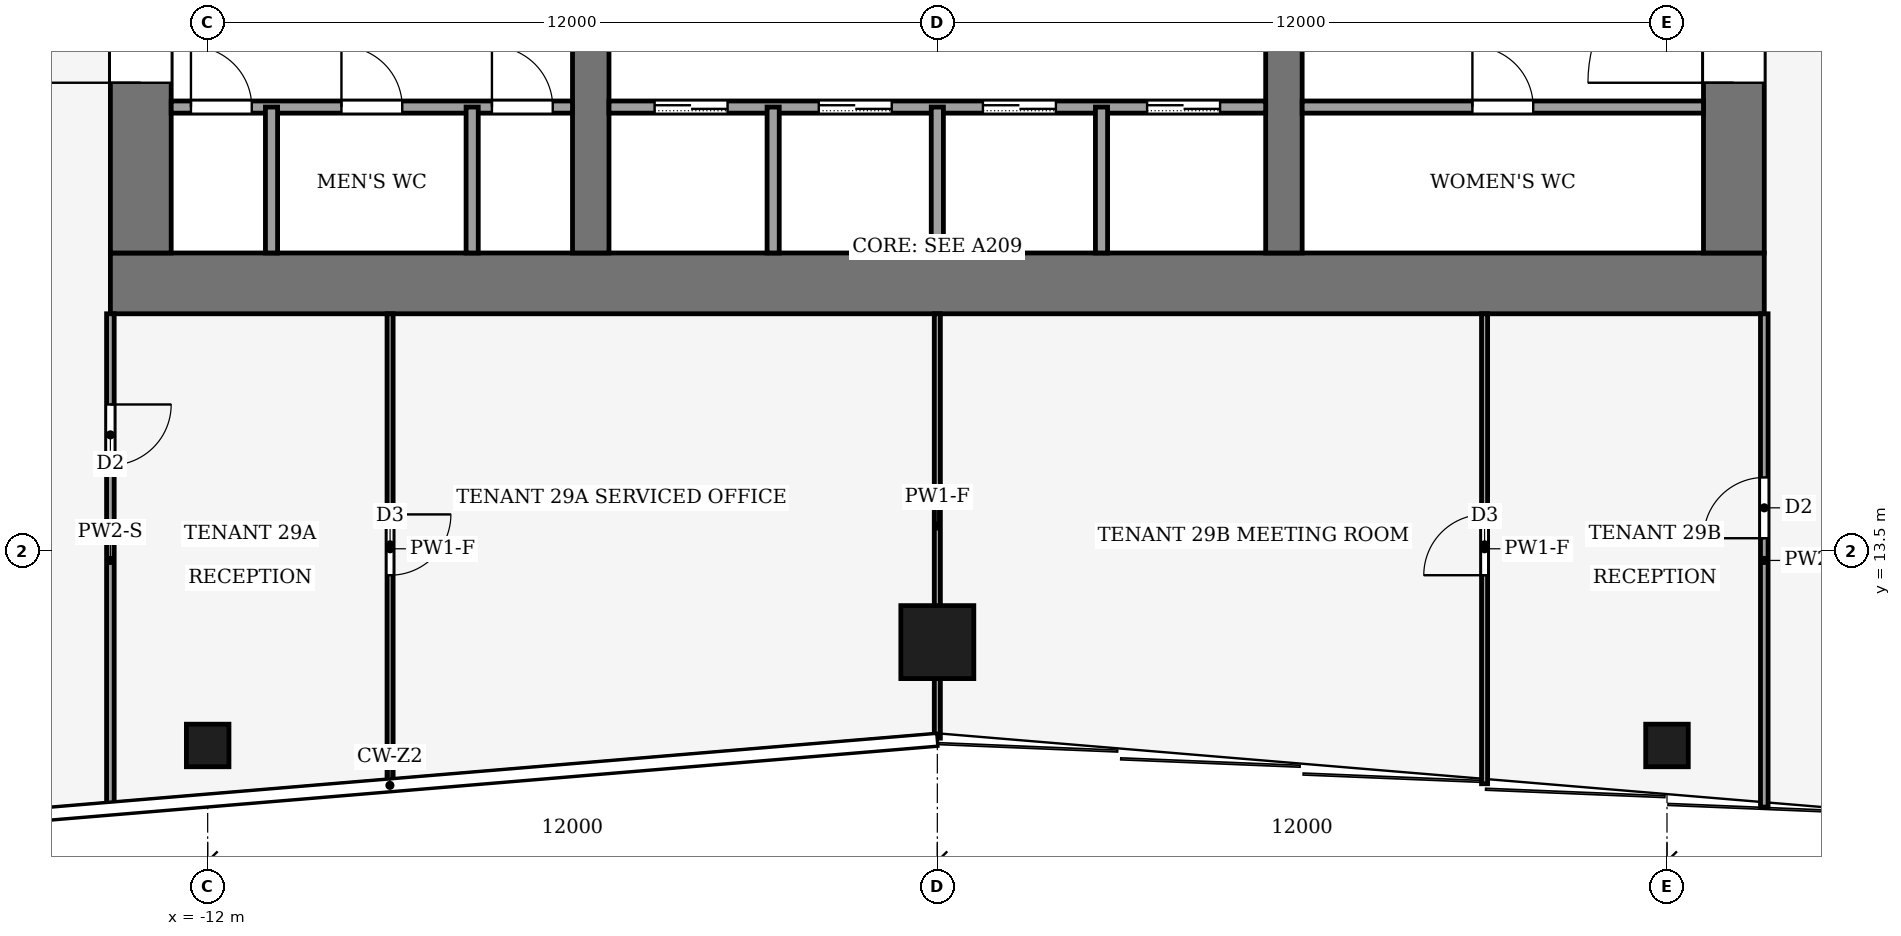
"""IFC4 building model, lengths in metres.
Left out: names, types, materials, properties, quantities, classifications, styles, units other than length and angle.
Written with IfcOpenShell. Run it as: python <this file> out.ifc"""

import sys

from ifc_helpers import new_model, si_unit, direction, frame, frame_2d, origin, origin_2d, place, context, subcontext, project, spatial, rectangle, hollow_rectangle, extrude, element, fill, save


model = new_model("IFC4")
c1 = context("Model", 3, precision=1e-05, world=origin(), true_north=direction((0.0, 1.0)))
c2 = subcontext(c1, "Body", "Model", "MODEL_VIEW")
j1 = project(units=[si_unit("LENGTHUNIT", "METRE"), si_unit("PLANEANGLEUNIT", "RADIAN")], contexts=[c1])
p1 = place(None, origin())
s1 = spatial("IfcSite", under=j1, at=p1, CompositionType="ELEMENT")
p2 = place(p1, origin())
s2 = spatial("IfcBuilding", under=s1, at=p2, CompositionType="ELEMENT")
p3 = place(p2, frame((0.0, 0.0, 130.0)))
s3 = spatial("IfcBuildingStorey", under=s2, at=p3, CompositionType="ELEMENT", Elevation=130.0)
p4 = place(p3, frame((-13.6, 17.9, -0.13), z_axis=(0.0, 0.0, 1.0), x_axis=(1.0, 0.0, 0.0)))
e1 = element("IfcWall", 1, at=p4, inside=s3, PredefinedType="SHEAR", context=c2, shape_type="SweptSolid", body=[
    extrude(rectangle(XDim=27.2, YDim=1.0, at=frame_2d((13.6, 0.0))), origin(), (0.0, 0.0, 1.0), 4.0),
])
p5 = place(p3, frame((-13.1, 18.4, -0.13), z_axis=(0.0, 0.0, 1.0), x_axis=(0.0, 1.0, 0.0)))
e2 = element("IfcWall", 2, at=p5, inside=s3, PredefinedType="SHEAR", context=c2, shape_type="SweptSolid", body=[
    extrude(rectangle(XDim=19.2, YDim=1.0, at=frame_2d((9.6, 0.0))), origin(), (0.0, 0.0, 1.0), 4.0),
])
p6 = place(p5, frame((2.8, 0.0, 0.13)))
e3 = element("IfcOpeningElement", 3, at=p6, cuts=e2, PredefinedType="OPENING", context=c2, shape_type="SweptSolid", body=[
    extrude(rectangle(XDim=2.4, YDim=2.4, at=frame_2d((1.2, 1.2))), frame((0.0, 0.51, 0.0), z_axis=(0.0, -1.0, 0.0), x_axis=(1.0, 0.0, 0.0)), (0.0, 0.0, 1.0), 1.02),
])
p7 = place(p5, frame((13.4, 0.0, 0.13)))
e4 = element("IfcOpeningElement", 4, at=p7, cuts=e2, PredefinedType="OPENING", context=c2, shape_type="SweptSolid", body=[
    extrude(rectangle(XDim=1.4, YDim=2.2, at=frame_2d((0.7, 1.1))), frame((0.0, 0.51, 0.0), z_axis=(0.0, -1.0, 0.0), x_axis=(1.0, 0.0, 0.0)), (0.0, 0.0, 1.0), 1.02),
])
p8 = place(p3, frame((13.1, 18.4, -0.13), z_axis=(0.0, 0.0, 1.0), x_axis=(0.0, 1.0, 0.0)))
e5 = element("IfcWall", 5, at=p8, inside=s3, PredefinedType="SHEAR", context=c2, shape_type="SweptSolid", body=[
    extrude(rectangle(XDim=19.2, YDim=1.0, at=frame_2d((9.6, 0.0))), origin(), (0.0, 0.0, 1.0), 4.0),
])
p9 = place(p8, frame((2.8, 0.0, 0.13)))
e6 = element("IfcOpeningElement", 6, at=p9, cuts=e5, PredefinedType="OPENING", context=c2, shape_type="SweptSolid", body=[
    extrude(rectangle(XDim=2.4, YDim=2.4, at=frame_2d((1.2, 1.2))), frame((0.0, 0.51, 0.0), z_axis=(0.0, -1.0, 0.0), x_axis=(1.0, 0.0, 0.0)), (0.0, 0.0, 1.0), 1.02),
])
p10 = place(p8, frame((13.3, 0.0, 0.13)))
e7 = element("IfcOpeningElement", 7, at=p10, cuts=e5, PredefinedType="OPENING", context=c2, shape_type="SweptSolid", body=[
    extrude(rectangle(XDim=2.4, YDim=2.4, at=frame_2d((1.2, 1.2))), frame((0.0, 0.51, 0.0), z_axis=(0.0, -1.0, 0.0), x_axis=(1.0, 0.0, 0.0)), (0.0, 0.0, 1.0), 1.02),
])
p11 = place(p3, frame((-5.7, 18.4, -0.13), z_axis=(0.0, 0.0, 1.0), x_axis=(0.0, 1.0, 0.0)))
e8 = element("IfcWall", 8, at=p11, inside=s3, PredefinedType="SHEAR", context=c2, shape_type="SweptSolid", body=[
    extrude(rectangle(XDim=19.2, YDim=0.6, at=frame_2d((9.6, 0.0))), origin(), (0.0, 0.0, 1.0), 4.0),
])
p12 = place(p11, frame((8.35, 0.0, 0.13)))
e9 = element("IfcOpeningElement", 9, at=p12, cuts=e8, PredefinedType="OPENING", context=c2, shape_type="SweptSolid", body=[
    extrude(rectangle(XDim=0.9, YDim=2.1, at=frame_2d((0.45, 1.05))), frame((0.0, 0.31, 0.0), z_axis=(0.0, -1.0, 0.0), x_axis=(1.0, 0.0, 0.0)), (0.0, 0.0, 1.0), 0.62),
])
p13 = place(p3, frame((5.7, 18.4, -0.13), z_axis=(0.0, 0.0, 1.0), x_axis=(0.0, 1.0, 0.0)))
e10 = element("IfcWall", 10, at=p13, inside=s3, PredefinedType="SHEAR", context=c2, shape_type="SweptSolid", body=[
    extrude(rectangle(XDim=19.2, YDim=0.6, at=frame_2d((9.6, 0.0))), origin(), (0.0, 0.0, 1.0), 4.0),
])
p14 = place(p13, frame((8.35, 0.0, 0.13)))
e11 = element("IfcOpeningElement", 11, at=p14, cuts=e10, PredefinedType="OPENING", context=c2, shape_type="SweptSolid", body=[
    extrude(rectangle(XDim=0.9, YDim=2.1, at=frame_2d((0.45, 1.05))), frame((0.0, 0.31, 0.0), z_axis=(0.0, -1.0, 0.0), x_axis=(1.0, 0.0, 0.0)), (0.0, 0.0, 1.0), 0.62),
])
p15 = place(p13, frame((13.3, 0.0, 0.13)))
e12 = element("IfcOpeningElement", 12, at=p15, cuts=e10, PredefinedType="OPENING", context=c2, shape_type="SweptSolid", body=[
    extrude(rectangle(XDim=2.4, YDim=2.4, at=frame_2d((1.2, 1.2))), frame((0.0, 0.31, 0.0), z_axis=(0.0, -1.0, 0.0), x_axis=(1.0, 0.0, 0.0)), (0.0, 0.0, 1.0), 0.62),
])
p16 = place(p3, frame((0.0, 12.0, 0.0), z_axis=(0.0, 0.0, 1.0), x_axis=(1.0, 0.0, 0.0)))
e13 = element("IfcColumn", 13, at=p16, inside=s3, PredefinedType="COLUMN", context=c2, shape_type="SweptSolid", body=[
    extrude(hollow_rectangle(XDim=1.2, YDim=1.2, WallThickness=0.07, at=origin_2d()), origin(), (0.0, 0.0, 1.0), 4.0),
])
for number, where, z_axis, x_axis in (
    (14, (-12.0, 10.3, 0.0), (0.0, 0.0, 1.0), (1.0, 0.0, 0.0)),
    (15, (12.0, 10.3, 0.0), (0.0, 0.0, 1.0), (1.0, 0.0, 0.0)),
):
    element("IfcColumn", number, at=place(p3, frame(where, z_axis=z_axis, x_axis=x_axis)), inside=s3, PredefinedType="COLUMN", context=c2, shape_type="SweptSolid", body=[
        extrude(hollow_rectangle(XDim=0.7, YDim=0.7, WallThickness=0.03, at=origin_2d()), origin(), (0.0, 0.0, 1.0), 4.0),
    ])
p17 = place(p3, frame((-12.6, 20.8, 0.0), z_axis=(0.0, 0.0, 1.0), x_axis=(1.0, 0.0, 0.0)))
e16 = element("IfcWall", 16, at=p17, inside=s3, PredefinedType="PARTITIONING", context=c2, shape_type="SweptSolid", body=[
    extrude(rectangle(XDim=6.6, YDim=0.2, at=frame_2d((3.3, 0.0))), origin(), (0.0, 0.0, 1.0), 3.87),
])
p18 = place(p17, frame((0.325, 0.0, 0.0)))
e17 = element("IfcOpeningElement", 17, at=p18, cuts=e16, PredefinedType="OPENING", context=c2, shape_type="SweptSolid", body=[
    extrude(rectangle(XDim=1.0, YDim=2.1, at=frame_2d((0.5, 1.05))), frame((0.0, 0.11, 0.0), z_axis=(0.0, -1.0, 0.0), x_axis=(1.0, 0.0, 0.0)), (0.0, 0.0, 1.0), 0.22),
])
p19 = place(p17, frame((2.8, 0.0, 0.0)))
e18 = element("IfcOpeningElement", 18, at=p19, cuts=e16, PredefinedType="OPENING", context=c2, shape_type="SweptSolid", body=[
    extrude(rectangle(XDim=1.0, YDim=2.1, at=frame_2d((0.5, 1.05))), frame((0.0, 0.11, 0.0), z_axis=(0.0, -1.0, 0.0), x_axis=(1.0, 0.0, 0.0)), (0.0, 0.0, 1.0), 0.22),
])
p20 = place(p17, frame((5.275, 0.0, 0.0)))
e19 = element("IfcOpeningElement", 19, at=p20, cuts=e16, PredefinedType="OPENING", context=c2, shape_type="SweptSolid", body=[
    extrude(rectangle(XDim=1.0, YDim=2.1, at=frame_2d((0.5, 1.05))), frame((0.0, 0.11, 0.0), z_axis=(0.0, -1.0, 0.0), x_axis=(1.0, 0.0, 0.0)), (0.0, 0.0, 1.0), 0.22),
])
p21 = place(p3, frame((-5.4, 20.8, 0.0), z_axis=(0.0, 0.0, 1.0), x_axis=(1.0, 0.0, 0.0)))
e20 = element("IfcWall", 20, at=p21, inside=s3, PredefinedType="PARTITIONING", context=c2, shape_type="SweptSolid", body=[
    extrude(rectangle(XDim=10.8, YDim=0.2, at=frame_2d((5.4, 0.0))), origin(), (0.0, 0.0, 1.0), 3.87),
])
p22 = place(p21, frame((0.75, 0.0, 0.0)))
e21 = element("IfcOpeningElement", 21, at=p22, cuts=e20, PredefinedType="OPENING", context=c2, shape_type="SweptSolid", body=[
    extrude(rectangle(XDim=1.2, YDim=2.2, at=frame_2d((0.6, 1.1))), frame((0.0, 0.11, 0.0), z_axis=(0.0, -1.0, 0.0), x_axis=(1.0, 0.0, 0.0)), (0.0, 0.0, 1.0), 0.22),
])
p23 = place(p21, frame((3.45, 0.0, 0.0)))
e22 = element("IfcOpeningElement", 22, at=p23, cuts=e20, PredefinedType="OPENING", context=c2, shape_type="SweptSolid", body=[
    extrude(rectangle(XDim=1.2, YDim=2.2, at=frame_2d((0.6, 1.1))), frame((0.0, 0.11, 0.0), z_axis=(0.0, -1.0, 0.0), x_axis=(1.0, 0.0, 0.0)), (0.0, 0.0, 1.0), 0.22),
])
p24 = place(p21, frame((6.15, 0.0, 0.0)))
e23 = element("IfcOpeningElement", 23, at=p24, cuts=e20, PredefinedType="OPENING", context=c2, shape_type="SweptSolid", body=[
    extrude(rectangle(XDim=1.2, YDim=2.2, at=frame_2d((0.6, 1.1))), frame((0.0, 0.11, 0.0), z_axis=(0.0, -1.0, 0.0), x_axis=(1.0, 0.0, 0.0)), (0.0, 0.0, 1.0), 0.22),
])
p25 = place(p21, frame((8.85, 0.0, 0.0)))
e24 = element("IfcOpeningElement", 24, at=p25, cuts=e20, PredefinedType="OPENING", context=c2, shape_type="SweptSolid", body=[
    extrude(rectangle(XDim=1.2, YDim=2.2, at=frame_2d((0.6, 1.1))), frame((0.0, 0.11, 0.0), z_axis=(0.0, -1.0, 0.0), x_axis=(1.0, 0.0, 0.0)), (0.0, 0.0, 1.0), 0.22),
])
p26 = place(p3, frame((6.0, 20.8, 0.0), z_axis=(0.0, 0.0, 1.0), x_axis=(1.0, 0.0, 0.0)))
e25 = element("IfcWall", 25, at=p26, inside=s3, PredefinedType="PARTITIONING", context=c2, shape_type="SweptSolid", body=[
    extrude(rectangle(XDim=6.6, YDim=0.2, at=frame_2d((3.3, 0.0))), origin(), (0.0, 0.0, 1.0), 3.87),
])
p27 = place(p26, frame((2.8, 0.0, 0.0)))
e26 = element("IfcOpeningElement", 26, at=p27, cuts=e25, PredefinedType="OPENING", context=c2, shape_type="SweptSolid", body=[
    extrude(rectangle(XDim=1.0, YDim=2.1, at=frame_2d((0.5, 1.05))), frame((0.0, 0.11, 0.0), z_axis=(0.0, -1.0, 0.0), x_axis=(1.0, 0.0, 0.0)), (0.0, 0.0, 1.0), 0.22),
])
for number, where, z_axis, x_axis in (
    (27, (-10.95, 18.4, 0.0), (0.0, 0.0, 1.0), (0.0, 1.0, 0.0)),
    (28, (-7.65, 18.4, 0.0), (0.0, 0.0, 1.0), (0.0, 1.0, 0.0)),
    (29, (-2.7, 18.4, 0.0), (0.0, 0.0, 1.0), (0.0, 1.0, 0.0)),
    (30, (0.0, 18.4, 0.0), (0.0, 0.0, 1.0), (0.0, 1.0, 0.0)),
    (31, (2.7, 18.4, 0.0), (0.0, 0.0, 1.0), (0.0, 1.0, 0.0)),
):
    element("IfcWall", number, at=place(p3, frame(where, z_axis=z_axis, x_axis=x_axis)), inside=s3, PredefinedType="PARTITIONING", context=c2, shape_type="SweptSolid", body=[
        extrude(rectangle(XDim=2.4, YDim=0.2, at=frame_2d((1.2, 0.0))), origin(), (0.0, 0.0, 1.0), 3.87),
    ])
p28 = place(p3, frame((-13.6, 17.4, 0.0), z_axis=(0.0, 0.0, 1.0), x_axis=(0.0, -1.0, 0.0)))
e32 = element("IfcWall", 32, at=p28, inside=s3, PredefinedType="PARTITIONING", context=c2, shape_type="SweptSolid", body=[
    extrude(rectangle(XDim=8.113, YDim=0.125, at=frame_2d((4.057, 0.0))), origin(), (0.0, 0.0, 1.0), 3.04),
])
p29 = place(p28, frame((1.492, 0.0, 0.0)))
e33 = element("IfcOpeningElement", 33, at=p29, cuts=e32, PredefinedType="OPENING", context=c2, shape_type="SweptSolid", body=[
    extrude(rectangle(XDim=1.0, YDim=2.1, at=frame_2d((0.5, 1.05))), frame((0.0, 0.073, 0.0), z_axis=(0.0, -1.0, 0.0), x_axis=(1.0, 0.0, 0.0)), (0.0, 0.0, 1.0), 0.145),
])
p30 = place(p3, frame((13.6, 9.287, 0.0), z_axis=(0.0, 0.0, 1.0), x_axis=(0.0, 1.0, 0.0)))
e34 = element("IfcWall", 34, at=p30, inside=s3, PredefinedType="PARTITIONING", context=c2, shape_type="SweptSolid", body=[
    extrude(rectangle(XDim=8.113, YDim=0.125, at=frame_2d((4.057, 0.0))), origin(), (0.0, 0.0, 1.0), 3.04),
])
p31 = place(p30, frame((4.422, 0.0, 0.0)))
e35 = element("IfcOpeningElement", 35, at=p31, cuts=e34, PredefinedType="OPENING", context=c2, shape_type="SweptSolid", body=[
    extrude(rectangle(XDim=1.0, YDim=2.1, at=frame_2d((0.5, 1.05))), frame((0.0, 0.073, 0.0), z_axis=(0.0, -1.0, 0.0), x_axis=(1.0, 0.0, 0.0)), (0.0, 0.0, 1.0), 0.145),
])
p32 = place(p3, frame((-9.0, 17.4, 0.0), z_axis=(0.0, 0.0, 1.0), x_axis=(0.0, -1.0, 0.0)))
e36 = element("IfcWall", 36, at=p32, inside=s3, PredefinedType="PARTITIONING", context=c2, shape_type="SweptSolid", body=[
    extrude(rectangle(XDim=7.73, YDim=0.1, at=frame_2d((3.865, 0.0))), origin(), (0.0, 0.0, 1.0), 3.04),
])
p33 = place(p32, frame((3.3, 0.0, 0.0)))
e37 = element("IfcOpeningElement", 37, at=p33, cuts=e36, PredefinedType="OPENING", context=c2, shape_type="SweptSolid", body=[
    extrude(rectangle(XDim=1.0, YDim=2.1, at=frame_2d((0.5, 1.05))), frame((0.0, 0.06, 0.0), z_axis=(0.0, -1.0, 0.0), x_axis=(1.0, 0.0, 0.0)), (0.0, 0.0, 1.0), 0.12),
])
p34 = place(p3, frame((0.0, 10.42, 0.0), z_axis=(0.0, 0.0, 1.0), x_axis=(0.0, 1.0, 0.0)))
e38 = element("IfcWall", 38, at=p34, inside=s3, PredefinedType="PARTITIONING", context=c2, shape_type="SweptSolid", body=[
    extrude(rectangle(XDim=6.98, YDim=0.1, at=frame_2d((3.49, 0.0))), origin(), (0.0, 0.0, 1.0), 3.04),
])
p35 = place(p3, frame((9.0, 9.67, 0.0), z_axis=(0.0, 0.0, 1.0), x_axis=(0.0, 1.0, 0.0)))
e39 = element("IfcWall", 39, at=p35, inside=s3, PredefinedType="PARTITIONING", context=c2, shape_type="SweptSolid", body=[
    extrude(rectangle(XDim=7.73, YDim=0.1, at=frame_2d((3.865, 0.0))), origin(), (0.0, 0.0, 1.0), 3.04),
])
p36 = place(p35, frame((3.43, 0.0, 0.0)))
e40 = element("IfcOpeningElement", 40, at=p36, cuts=e39, PredefinedType="OPENING", context=c2, shape_type="SweptSolid", body=[
    extrude(rectangle(XDim=1.0, YDim=2.1, at=frame_2d((0.5, 1.05))), frame((0.0, 0.06, 0.0), z_axis=(0.0, -1.0, 0.0), x_axis=(1.0, 0.0, 0.0)), (0.0, 0.0, 1.0), 0.12),
])
p37 = place(p22, origin())
e41 = element("IfcDoor", 41, at=p37, inside=s3, OperationType="SLIDING_TO_LEFT", PredefinedType="DOOR", context=c2, shape_type="SweptSolid", body=[
    extrude(rectangle(XDim=1.2, YDim=2.2, at=frame_2d((0.6, 1.1))), frame((0.0, 0.025, 0.0), z_axis=(0.0, -1.0, 0.0), x_axis=(1.0, 0.0, 0.0)), (0.0, 0.0, 1.0), 0.05),
])
fill(e21, e41)
p38 = place(p23, origin())
e42 = element("IfcDoor", 42, at=p38, inside=s3, OperationType="SLIDING_TO_LEFT", PredefinedType="DOOR", context=c2, shape_type="SweptSolid", body=[
    extrude(rectangle(XDim=1.2, YDim=2.2, at=frame_2d((0.6, 1.1))), frame((0.0, 0.025, 0.0), z_axis=(0.0, -1.0, 0.0), x_axis=(1.0, 0.0, 0.0)), (0.0, 0.0, 1.0), 0.05),
])
fill(e22, e42)
p39 = place(p24, origin())
e43 = element("IfcDoor", 43, at=p39, inside=s3, OperationType="SLIDING_TO_LEFT", PredefinedType="DOOR", context=c2, shape_type="SweptSolid", body=[
    extrude(rectangle(XDim=1.2, YDim=2.2, at=frame_2d((0.6, 1.1))), frame((0.0, 0.025, 0.0), z_axis=(0.0, -1.0, 0.0), x_axis=(1.0, 0.0, 0.0)), (0.0, 0.0, 1.0), 0.05),
])
fill(e23, e43)
p40 = place(p25, origin())
e44 = element("IfcDoor", 44, at=p40, inside=s3, OperationType="SLIDING_TO_LEFT", PredefinedType="DOOR", context=c2, shape_type="SweptSolid", body=[
    extrude(rectangle(XDim=1.2, YDim=2.2, at=frame_2d((0.6, 1.1))), frame((0.0, 0.025, 0.0), z_axis=(0.0, -1.0, 0.0), x_axis=(1.0, 0.0, 0.0)), (0.0, 0.0, 1.0), 0.05),
])
fill(e24, e44)
p41 = place(p18, origin())
e45 = element("IfcDoor", 45, at=p41, inside=s3, OperationType="SINGLE_SWING_RIGHT", PredefinedType="DOOR", context=c2, shape_type="SweptSolid", body=[
    extrude(rectangle(XDim=1.0, YDim=2.1, at=frame_2d((0.5, 1.05))), frame((0.0, 0.025, 0.0), z_axis=(0.0, -1.0, 0.0), x_axis=(1.0, 0.0, 0.0)), (0.0, 0.0, 1.0), 0.05),
])
fill(e17, e45)
p42 = place(p19, origin())
e46 = element("IfcDoor", 46, at=p42, inside=s3, OperationType="SINGLE_SWING_RIGHT", PredefinedType="DOOR", context=c2, shape_type="SweptSolid", body=[
    extrude(rectangle(XDim=1.0, YDim=2.1, at=frame_2d((0.5, 1.05))), frame((0.0, 0.025, 0.0), z_axis=(0.0, -1.0, 0.0), x_axis=(1.0, 0.0, 0.0)), (0.0, 0.0, 1.0), 0.05),
])
fill(e18, e46)
p43 = place(p20, origin())
e47 = element("IfcDoor", 47, at=p43, inside=s3, OperationType="SINGLE_SWING_RIGHT", PredefinedType="DOOR", context=c2, shape_type="SweptSolid", body=[
    extrude(rectangle(XDim=1.0, YDim=2.1, at=frame_2d((0.5, 1.05))), frame((0.0, 0.025, 0.0), z_axis=(0.0, -1.0, 0.0), x_axis=(1.0, 0.0, 0.0)), (0.0, 0.0, 1.0), 0.05),
])
fill(e19, e47)
p44 = place(p27, origin())
e48 = element("IfcDoor", 48, at=p44, inside=s3, OperationType="SINGLE_SWING_RIGHT", PredefinedType="DOOR", context=c2, shape_type="SweptSolid", body=[
    extrude(rectangle(XDim=1.0, YDim=2.1, at=frame_2d((0.5, 1.05))), frame((0.0, 0.025, 0.0), z_axis=(0.0, -1.0, 0.0), x_axis=(1.0, 0.0, 0.0)), (0.0, 0.0, 1.0), 0.05),
])
fill(e26, e48)
p45 = place(p6, origin())
e49 = element("IfcDoor", 49, at=p45, inside=s3, OperationType="DOUBLE_DOOR_SINGLE_SWING", PredefinedType="DOOR", context=c2, shape_type="SweptSolid", body=[
    extrude(rectangle(XDim=2.4, YDim=2.4, at=frame_2d((1.2, 1.2))), frame((0.0, 0.025, 0.0), z_axis=(0.0, -1.0, 0.0), x_axis=(1.0, 0.0, 0.0)), (0.0, 0.0, 1.0), 0.05),
])
fill(e3, e49)
p46 = place(p9, origin())
e50 = element("IfcDoor", 50, at=p46, inside=s3, OperationType="DOUBLE_DOOR_SINGLE_SWING", PredefinedType="DOOR", context=c2, shape_type="SweptSolid", body=[
    extrude(rectangle(XDim=2.4, YDim=2.4, at=frame_2d((1.2, 1.2))), frame((0.0, 0.025, 0.0), z_axis=(0.0, -1.0, 0.0), x_axis=(1.0, 0.0, 0.0)), (0.0, 0.0, 1.0), 0.05),
])
fill(e6, e50)
p47 = place(p29, origin())
e51 = element("IfcDoor", 51, at=p47, inside=s3, OperationType="SINGLE_SWING_LEFT", PredefinedType="DOOR", context=c2, shape_type="SweptSolid", body=[
    extrude(rectangle(XDim=1.0, YDim=2.1, at=frame_2d((0.5, 1.05))), frame((0.0, 0.025, 0.0), z_axis=(0.0, -1.0, 0.0), x_axis=(1.0, 0.0, 0.0)), (0.0, 0.0, 1.0), 0.05),
])
fill(e33, e51)
p48 = place(p31, origin())
e52 = element("IfcDoor", 52, at=p48, inside=s3, OperationType="SINGLE_SWING_RIGHT", PredefinedType="DOOR", context=c2, shape_type="SweptSolid", body=[
    extrude(rectangle(XDim=1.0, YDim=2.1, at=frame_2d((0.5, 1.05))), frame((0.0, 0.025, 0.0), z_axis=(0.0, -1.0, 0.0), x_axis=(1.0, 0.0, 0.0)), (0.0, 0.0, 1.0), 0.05),
])
fill(e35, e52)
p49 = place(p33, origin())
e53 = element("IfcDoor", 53, at=p49, inside=s3, OperationType="SINGLE_SWING_LEFT", PredefinedType="DOOR", context=c2, shape_type="SweptSolid", body=[
    extrude(rectangle(XDim=1.0, YDim=2.1, at=frame_2d((0.5, 1.05))), frame((0.0, 0.025, 0.0), z_axis=(0.0, -1.0, 0.0), x_axis=(1.0, 0.0, 0.0)), (0.0, 0.0, 1.0), 0.05),
])
fill(e37, e53)
p50 = place(p36, origin())
e54 = element("IfcDoor", 54, at=p50, inside=s3, OperationType="SINGLE_SWING_RIGHT", PredefinedType="DOOR", context=c2, shape_type="SweptSolid", body=[
    extrude(rectangle(XDim=1.0, YDim=2.1, at=frame_2d((0.5, 1.05))), frame((0.0, 0.025, 0.0), z_axis=(0.0, -1.0, 0.0), x_axis=(1.0, 0.0, 0.0)), (0.0, 0.0, 1.0), 0.05),
])
fill(e40, e54)
save(model, sys.argv[1])
